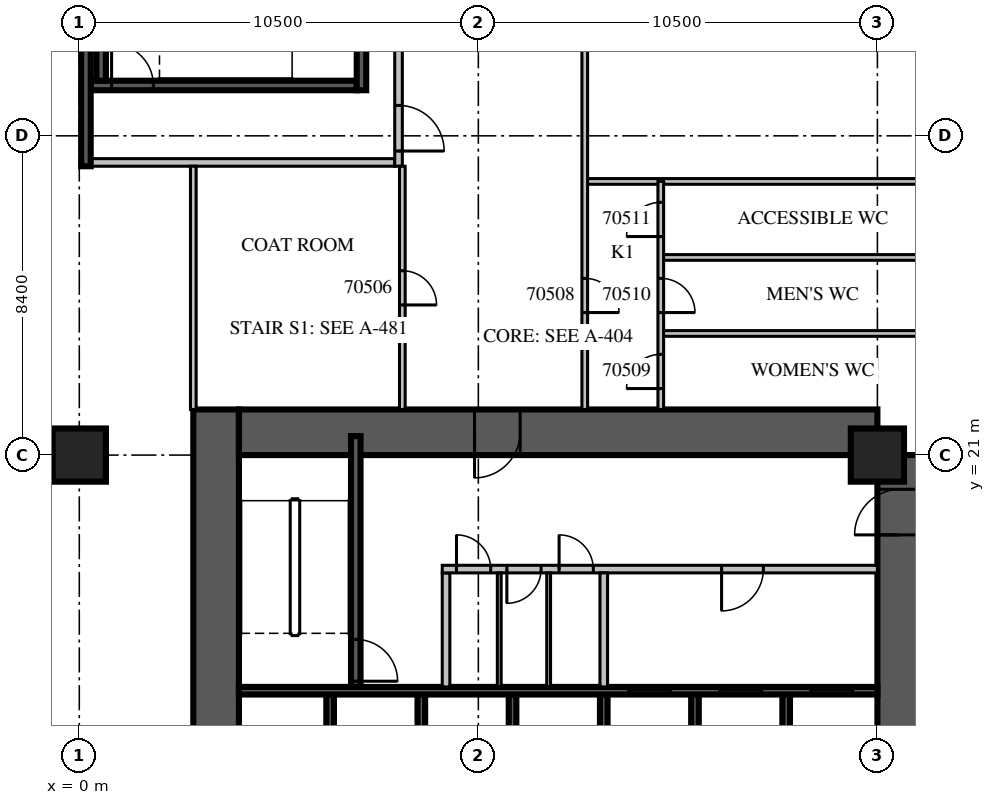
"""IFC4 building model, lengths in metres.
Left out: names, types, materials, properties, quantities, classifications, styles, units other than length and angle.
Written with IfcOpenShell. Run it as: python <this file> out.ifc"""

import sys

from ifc_helpers import new_model, si_unit, direction, frame, frame_2d, origin, origin_2d, place, context, subcontext, project, spatial, rectangle, extrude, source, transform, mapped, element, fill, save


model = new_model("IFC4")
c1 = context("Model", 3, precision=1e-05, world=origin(), true_north=direction((0.0, 1.0)))
c2 = subcontext(c1, "Body", "Model", "MODEL_VIEW")
j1 = project(units=[si_unit("LENGTHUNIT", "METRE"), si_unit("PLANEANGLEUNIT", "RADIAN")], contexts=[c1])
p1 = place(None, origin())
s1 = spatial("IfcSite", under=j1, at=p1, CompositionType="ELEMENT")
p2 = place(p1, origin())
s2 = spatial("IfcBuilding", under=s1, at=p2, CompositionType="ELEMENT")
p3 = place(p2, frame((0.0, 0.0, 12.9)))
s3 = spatial("IfcBuildingStorey", under=s2, at=p3, CompositionType="ELEMENT", Elevation=12.9)
m1 = source(origin(), c2, "Body", "SweptSolid", [
    extrude(rectangle(XDim=1.4, YDim=1.4, at=origin_2d()), origin(), (0.0, 0.0, 1.0), 5.4),
])
for number, where, z_axis, x_axis in (
    (1, (0.0, 21.0, 0.0), (0.0, 0.0, 1.0), (1.0, 0.0, 0.0)),
    (2, (21.0, 21.0, 0.0), (0.0, 0.0, 1.0), (1.0, 0.0, 0.0)),
):
    element("IfcColumn", number, at=place(p3, frame(where, z_axis=z_axis, x_axis=x_axis)), inside=s3, PredefinedType="COLUMN", context=c2, shape_type="MappedRepresentation", body=[
        mapped(m1, transform((0.0, 0.0, 0.0), scale=1.0)),
    ])
m2 = source(origin(), c2, "Body", "SweptSolid", [
    extrude(rectangle(XDim=18.0, YDim=1.2, at=frame_2d((9.0, 0.0))), origin(), (0.0, 0.0, 1.0), 5.4),
])
p4 = place(p3, frame((3.6, 4.2, 0.0), z_axis=(0.0, 0.0, 1.0), x_axis=(0.0, 1.0, 0.0)))
e3 = element("IfcWall", 3, at=p4, inside=s3, PredefinedType="SHEAR", context=c2, shape_type="MappedRepresentation", body=[
    mapped(m2, transform((0.0, 0.0, 0.0), scale=1.0)),
])
m3 = source(origin(), c2, "Body", "SweptSolid", [
    extrude(rectangle(XDim=2.2, YDim=2.1, at=frame_2d((1.1, 1.05))), frame((0.0, 0.61, 0.0), z_axis=(0.0, -1.0, 0.0), x_axis=(1.0, 0.0, 0.0)), (0.0, 0.0, 1.0), 1.22),
])
p5 = place(p4, frame((4.6, 0.0, 0.0)))
e4 = element("IfcOpeningElement", 4, at=p5, cuts=e3, PredefinedType="OPENING", context=c2, shape_type="MappedRepresentation", body=[
    mapped(m3, transform((0.0, 0.0, 0.0), scale=1.0)),
])
m4 = source(origin(), c2, "Body", "SweptSolid", [
    extrude(rectangle(XDim=16.8, YDim=1.2, at=frame_2d((8.4, 0.0))), origin(), (0.0, 0.0, 1.0), 5.4),
])
p6 = place(p3, frame((21.6, 4.2, 0.0), z_axis=(0.0, 0.0, 1.0), x_axis=(0.0, 1.0, 0.0)))
e5 = element("IfcWall", 5, at=p6, inside=s3, PredefinedType="SHEAR", context=c2, shape_type="MappedRepresentation", body=[
    mapped(m4, transform((0.0, 0.0, 0.0), scale=1.0)),
])
p7 = place(p6, frame((4.2, 0.0, 0.0)))
e6 = element("IfcOpeningElement", 6, at=p7, cuts=e5, PredefinedType="OPENING", context=c2, shape_type="MappedRepresentation", body=[
    mapped(m3, transform((0.0, 0.0, 0.0), scale=1.0)),
])
m5 = source(origin(), c2, "Body", "SweptSolid", [
    extrude(rectangle(XDim=1.2, YDim=2.1, at=frame_2d((0.6, 1.05))), frame((0.0, 0.61, 0.0), z_axis=(0.0, -1.0, 0.0), x_axis=(1.0, 0.0, 0.0)), (0.0, 0.0, 1.0), 1.22),
])
p8 = place(p6, frame((14.7, 0.0, 0.0)))
e7 = element("IfcOpeningElement", 7, at=p8, cuts=e5, PredefinedType="OPENING", context=c2, shape_type="MappedRepresentation", body=[
    mapped(m5, transform((0.0, 0.0, 0.0), scale=1.0)),
])
p9 = place(p3, frame((4.2, 21.6, 0.0), z_axis=(0.0, 0.0, 1.0), x_axis=(1.0, 0.0, 0.0)))
e8 = element("IfcWall", 8, at=p9, inside=s3, PredefinedType="SHEAR", context=c2, shape_type="MappedRepresentation", body=[
    mapped(m4, transform((0.0, 0.0, 0.0), scale=1.0)),
])
p10 = place(p9, frame((6.2, 0.0, 0.0)))
e9 = element("IfcOpeningElement", 9, at=p10, cuts=e8, PredefinedType="OPENING", context=c2, shape_type="MappedRepresentation", body=[
    mapped(m5, transform((0.0, 0.0, 0.0), scale=1.0)),
])
m6 = source(origin(), c2, "Body", "SweptSolid", [
    extrude(rectangle(XDim=3.0, YDim=0.2, at=frame_2d((1.5, 0.0))), origin(), (0.0, 0.0, 1.0), 5.4),
])
for number, where, z_axis, x_axis in (
    (10, (6.6, 11.7, 0.0), (0.0, 0.0, 1.0), (0.0, 1.0, 0.0)),
    (11, (9.0, 11.7, 0.0), (0.0, 0.0, 1.0), (0.0, 1.0, 0.0)),
    (12, (11.4, 11.7, 0.0), (0.0, 0.0, 1.0), (0.0, 1.0, 0.0)),
    (13, (13.8, 11.7, 0.0), (0.0, 0.0, 1.0), (0.0, 1.0, 0.0)),
    (14, (16.2, 11.7, 0.0), (0.0, 0.0, 1.0), (0.0, 1.0, 0.0)),
    (15, (18.6, 11.7, 0.0), (0.0, 0.0, 1.0), (0.0, 1.0, 0.0)),
):
    element("IfcWall", number, at=place(p3, frame(where, z_axis=z_axis, x_axis=x_axis)), inside=s3, PredefinedType="SOLIDWALL", context=c2, shape_type="MappedRepresentation", body=[
        mapped(m6, transform((0.0, 0.0, 0.0), scale=1.0)),
    ])
m7 = source(origin(), c2, "Body", "SweptSolid", [
    extrude(rectangle(XDim=16.8, YDim=0.2, at=frame_2d((8.4, 0.0))), origin(), (0.0, 0.0, 1.0), 5.4),
])
p11 = place(p3, frame((4.2, 14.8, 0.0), z_axis=(0.0, 0.0, 1.0), x_axis=(1.0, 0.0, 0.0)))
e16 = element("IfcWall", 16, at=p11, inside=s3, PredefinedType="SOLIDWALL", context=c2, shape_type="MappedRepresentation", body=[
    mapped(m7, transform((0.0, 0.0, 0.0), scale=1.0)),
])
m8 = source(origin(), c2, "Body", "SweptSolid", [
    extrude(rectangle(XDim=1.1, YDim=2.1, at=frame_2d((0.55, 1.05))), frame((0.0, 0.11, 0.0), z_axis=(0.0, -1.0, 0.0), x_axis=(1.0, 0.0, 0.0)), (0.0, 0.0, 1.0), 0.22),
])
p12 = place(p11, frame((10.25, 0.0, 0.0)))
e17 = element("IfcOpeningElement", 17, at=p12, cuts=e16, PredefinedType="OPENING", context=c2, shape_type="MappedRepresentation", body=[
    mapped(m8, transform((0.0, 0.0, 0.0), scale=1.0)),
])
p13 = place(p11, frame((12.65, 0.0, 0.0)))
e18 = element("IfcOpeningElement", 18, at=p13, cuts=e16, PredefinedType="OPENING", context=c2, shape_type="MappedRepresentation", body=[
    mapped(m8, transform((0.0, 0.0, 0.0), scale=1.0)),
])
p14 = place(p11, frame((15.05, 0.0, 0.0)))
e19 = element("IfcOpeningElement", 19, at=p14, cuts=e16, PredefinedType="OPENING", context=c2, shape_type="MappedRepresentation", body=[
    mapped(m8, transform((0.0, 0.0, 0.0), scale=1.0)),
])
m9 = source(origin(), c2, "Body", "SweptSolid", [
    extrude(rectangle(XDim=6.6, YDim=0.25, at=frame_2d((3.3, 0.0))), origin(), (0.0, 0.0, 1.0), 4.8),
])
p15 = place(p3, frame((7.275, 14.9, 0.0), z_axis=(0.0, 0.0, 1.0), x_axis=(0.0, 1.0, 0.0)))
e20 = element("IfcWall", 20, at=p15, inside=s3, PredefinedType="SOLIDWALL", context=c2, shape_type="MappedRepresentation", body=[
    mapped(m9, transform((0.0, 0.0, 0.0), scale=1.0)),
])
m10 = source(origin(), c2, "Body", "SweptSolid", [
    extrude(rectangle(XDim=1.1, YDim=2.1, at=frame_2d((0.55, 1.05))), frame((0.0, 0.135, 0.0), z_axis=(0.0, -1.0, 0.0), x_axis=(1.0, 0.0, 0.0)), (0.0, 0.0, 1.0), 0.27),
])
p16 = place(p15, frame((0.15, 0.0, 0.0)))
e21 = element("IfcOpeningElement", 21, at=p16, cuts=e20, PredefinedType="OPENING", context=c2, shape_type="MappedRepresentation", body=[
    mapped(m10, transform((0.0, 0.0, 0.0), scale=1.0)),
])
m11 = source(origin(), c2, "Body", "SweptSolid", [
    extrude(rectangle(XDim=3.0, YDim=0.2, at=frame_2d((1.5, 0.0))), origin(), (0.0, 0.0, 1.0), 4.8),
])
p17 = place(p3, frame((9.65, 14.9, 0.0), z_axis=(0.0, 0.0, 1.0), x_axis=(0.0, 1.0, 0.0)))
e22 = element("IfcWall", 22, at=p17, inside=s3, PredefinedType="PARTITIONING", context=c2, shape_type="MappedRepresentation", body=[
    mapped(m11, transform((0.0, 0.0, 0.0), scale=1.0)),
])
m12 = source(origin(), c2, "Body", "SweptSolid", [
    extrude(rectangle(XDim=11.45, YDim=0.2, at=frame_2d((5.725, 0.0))), origin(), (0.0, 0.0, 1.0), 4.8),
])
p18 = place(p3, frame((9.55, 18.0, 0.0), z_axis=(0.0, 0.0, 1.0), x_axis=(1.0, 0.0, 0.0)))
e23 = element("IfcWall", 23, at=p18, inside=s3, PredefinedType="PARTITIONING", context=c2, shape_type="MappedRepresentation", body=[
    mapped(m12, transform((0.0, 0.0, 0.0), scale=1.0)),
])
m13 = source(origin(), c2, "Body", "SweptSolid", [
    extrude(rectangle(XDim=0.9, YDim=2.1, at=frame_2d((0.45, 1.05))), frame((0.0, 0.11, 0.0), z_axis=(0.0, -1.0, 0.0), x_axis=(1.0, 0.0, 0.0)), (0.0, 0.0, 1.0), 0.22),
])
p19 = place(p18, frame((0.375, 0.0, 0.0)))
e24 = element("IfcOpeningElement", 24, at=p19, cuts=e23, PredefinedType="OPENING", context=c2, shape_type="MappedRepresentation", body=[
    mapped(m13, transform((0.0, 0.0, 0.0), scale=1.0)),
])
p20 = place(p18, frame((1.7, 0.0, 0.0)))
e25 = element("IfcOpeningElement", 25, at=p20, cuts=e23, PredefinedType="OPENING", context=c2, shape_type="MappedRepresentation", body=[
    mapped(m13, transform((0.0, 0.0, 0.0), scale=1.0)),
])
p21 = place(p18, frame((3.075, 0.0, 0.0)))
e26 = element("IfcOpeningElement", 26, at=p21, cuts=e23, PredefinedType="OPENING", context=c2, shape_type="MappedRepresentation", body=[
    mapped(m13, transform((0.0, 0.0, 0.0), scale=1.0)),
])
p22 = place(p18, frame((7.35, 0.0, 0.0)))
e27 = element("IfcOpeningElement", 27, at=p22, cuts=e23, PredefinedType="OPENING", context=c2, shape_type="MappedRepresentation", body=[
    mapped(m8, transform((0.0, 0.0, 0.0), scale=1.0)),
])
p23 = place(p3, frame((13.8, 14.9, 0.0), z_axis=(0.0, 0.0, 1.0), x_axis=(0.0, 1.0, 0.0)))
e28 = element("IfcWall", 28, at=p23, inside=s3, PredefinedType="PARTITIONING", context=c2, shape_type="MappedRepresentation", body=[
    mapped(m11, transform((0.0, 0.0, 0.0), scale=1.0)),
])
m14 = source(origin(), c2, "Body", "SweptSolid", [
    extrude(rectangle(XDim=3.0, YDim=0.1, at=frame_2d((1.5, 0.0))), origin(), (0.0, 0.0, 1.0), 4.8),
])
for number, where, z_axis, x_axis in (
    (29, (11.05, 14.9, 0.0), (0.0, 0.0, 1.0), (0.0, 1.0, 0.0)),
    (30, (12.35, 14.9, 0.0), (0.0, 0.0, 1.0), (0.0, 1.0, 0.0)),
):
    element("IfcWall", number, at=place(p3, frame(where, z_axis=z_axis, x_axis=x_axis)), inside=s3, PredefinedType="PARTITIONING", context=c2, shape_type="MappedRepresentation", body=[
        mapped(m14, transform((0.0, 0.0, 0.0), scale=1.0)),
    ])
m15 = source(origin(), c2, "Body", "SweptSolid", [
    extrude(rectangle(XDim=7.0, YDim=0.25, at=frame_2d((3.5, 0.0))), origin(), (0.0, 0.0, 1.0), 4.8),
])
p24 = place(p3, frame((0.3, 30.725, 0.0), z_axis=(0.0, 0.0, 1.0), x_axis=(1.0, 0.0, 0.0)))
e31 = element("IfcWall", 31, at=p24, inside=s3, PredefinedType="SOLIDWALL", context=c2, shape_type="MappedRepresentation", body=[
    mapped(m15, transform((0.0, 0.0, 0.0), scale=1.0)),
])
p25 = place(p24, frame((0.55, 0.0, 0.0)))
e32 = element("IfcOpeningElement", 32, at=p25, cuts=e31, PredefinedType="OPENING", context=c2, shape_type="MappedRepresentation", body=[
    mapped(m10, transform((0.0, 0.0, 0.0), scale=1.0)),
])
m16 = source(origin(), c2, "Body", "SweptSolid", [
    extrude(rectangle(XDim=3.45, YDim=0.25, at=frame_2d((1.725, 0.0))), origin(), (0.0, 0.0, 1.0), 4.8),
])
p26 = place(p3, frame((7.425, 30.6, 0.0), z_axis=(0.0, 0.0, 1.0), x_axis=(0.0, 1.0, 0.0)))
e33 = element("IfcWall", 33, at=p26, inside=s3, PredefinedType="SOLIDWALL", context=c2, shape_type="MappedRepresentation", body=[
    mapped(m16, transform((0.0, 0.0, 0.0), scale=1.0)),
])
m17 = source(origin(), c2, "Body", "SweptSolid", [
    extrude(rectangle(XDim=2.95, YDim=0.25, at=frame_2d((1.475, 0.0))), origin(), (0.0, 0.0, 1.0), 4.8),
])
p27 = place(p3, frame((0.575, 30.85, 0.0), z_axis=(0.0, 0.0, 1.0), x_axis=(0.0, 1.0, 0.0)))
e34 = element("IfcWall", 34, at=p27, inside=s3, PredefinedType="SOLIDWALL", context=c2, shape_type="MappedRepresentation", body=[
    mapped(m17, transform((0.0, 0.0, 0.0), scale=1.0)),
])
m18 = source(origin(), c2, "Body", "SweptSolid", [
    extrude(rectangle(XDim=8.0, YDim=0.2, at=frame_2d((4.0, 0.0))), origin(), (0.0, 0.0, 1.0), 4.8),
])
p28 = place(p3, frame((0.3, 28.7, 0.0), z_axis=(0.0, 0.0, 1.0), x_axis=(1.0, 0.0, 0.0)))
e35 = element("IfcWall", 35, at=p28, inside=s3, PredefinedType="PARTITIONING", context=c2, shape_type="MappedRepresentation", body=[
    mapped(m18, transform((0.0, 0.0, 0.0), scale=1.0)),
])
m19 = source(origin(), c2, "Body", "SweptSolid", [
    extrude(rectangle(XDim=5.45, YDim=0.2, at=frame_2d((2.725, 0.0))), origin(), (0.0, 0.0, 1.0), 4.8),
])
p29 = place(p3, frame((8.4, 28.6, 0.0), z_axis=(0.0, 0.0, 1.0), x_axis=(0.0, 1.0, 0.0)))
e36 = element("IfcWall", 36, at=p29, inside=s3, PredefinedType="PARTITIONING", context=c2, shape_type="MappedRepresentation", body=[
    mapped(m19, transform((0.0, 0.0, 0.0), scale=1.0)),
])
m20 = source(origin(), c2, "Body", "SweptSolid", [
    extrude(rectangle(XDim=1.2, YDim=2.1, at=frame_2d((0.6, 1.05))), frame((0.0, 0.11, 0.0), z_axis=(0.0, -1.0, 0.0), x_axis=(1.0, 0.0, 0.0)), (0.0, 0.0, 1.0), 0.22),
])
p30 = place(p29, frame((0.4, 0.0, 0.0)))
e37 = element("IfcOpeningElement", 37, at=p30, cuts=e36, PredefinedType="OPENING", context=c2, shape_type="MappedRepresentation", body=[
    mapped(m20, transform((0.0, 0.0, 0.0), scale=1.0)),
])
p31 = place(p29, frame((3.25, 0.0, 0.0)))
e38 = element("IfcOpeningElement", 38, at=p31, cuts=e36, PredefinedType="OPENING", context=c2, shape_type="MappedRepresentation", body=[
    mapped(m13, transform((0.0, 0.0, 0.0), scale=1.0)),
])
m21 = source(origin(), c2, "Body", "SweptSolid", [
    extrude(rectangle(XDim=5.45, YDim=0.25, at=frame_2d((2.725, 0.0))), origin(), (0.0, 0.0, 1.0), 4.8),
])
p32 = place(p3, frame((0.175, 28.6, 0.0), z_axis=(0.0, 0.0, 1.0), x_axis=(0.0, 1.0, 0.0)))
e39 = element("IfcWall", 39, at=p32, inside=s3, PredefinedType="SOLIDWALL", context=c2, shape_type="MappedRepresentation", body=[
    mapped(m21, transform((0.0, 0.0, 0.0), scale=1.0)),
])
m22 = source(origin(), c2, "Body", "SweptSolid", [
    extrude(rectangle(XDim=8.0, YDim=0.15, at=frame_2d((4.0, 0.0))), origin(), (0.0, 0.0, 1.0), 4.8),
])
for number, where, z_axis, x_axis in (
    (40, (15.3, 24.2, 0.0), (0.0, 0.0, 1.0), (1.0, 0.0, 0.0)),
    (41, (15.3, 26.2, 0.0), (0.0, 0.0, 1.0), (1.0, 0.0, 0.0)),
):
    element("IfcWall", number, at=place(p3, frame(where, z_axis=z_axis, x_axis=x_axis)), inside=s3, PredefinedType="PARTITIONING", context=c2, shape_type="MappedRepresentation", body=[
        mapped(m22, transform((0.0, 0.0, 0.0), scale=1.0)),
    ])
m23 = source(origin(), c2, "Body", "SweptSolid", [
    extrude(rectangle(XDim=10.0, YDim=0.15, at=frame_2d((5.0, 0.0))), origin(), (0.0, 0.0, 1.0), 4.8),
])
p33 = place(p3, frame((13.3, 28.2, 0.0), z_axis=(0.0, 0.0, 1.0), x_axis=(1.0, 0.0, 0.0)))
e42 = element("IfcWall", 42, at=p33, inside=s3, PredefinedType="PARTITIONING", context=c2, shape_type="MappedRepresentation", body=[
    mapped(m23, transform((0.0, 0.0, 0.0), scale=1.0)),
])
m24 = source(origin(), c2, "Body", "SweptSolid", [
    extrude(rectangle(XDim=6.4, YDim=0.15, at=frame_2d((3.2, 0.0))), origin(), (0.0, 0.0, 1.0), 4.8),
])
p34 = place(p3, frame((3.0, 22.2, 0.0), z_axis=(0.0, 0.0, 1.0), x_axis=(0.0, 1.0, 0.0)))
e43 = element("IfcWall", 43, at=p34, inside=s3, PredefinedType="PARTITIONING", context=c2, shape_type="MappedRepresentation", body=[
    mapped(m24, transform((0.0, 0.0, 0.0), scale=1.0)),
])
p35 = place(p3, frame((8.5, 22.2, 0.0), z_axis=(0.0, 0.0, 1.0), x_axis=(0.0, 1.0, 0.0)))
e44 = element("IfcWall", 44, at=p35, inside=s3, PredefinedType="PARTITIONING", context=c2, shape_type="MappedRepresentation", body=[
    mapped(m24, transform((0.0, 0.0, 0.0), scale=1.0)),
])
m25 = source(origin(), c2, "Body", "SweptSolid", [
    extrude(rectangle(XDim=0.9, YDim=2.1, at=frame_2d((0.45, 1.05))), frame((0.0, 0.085, 0.0), z_axis=(0.0, -1.0, 0.0), x_axis=(1.0, 0.0, 0.0)), (0.0, 0.0, 1.0), 0.17),
])
p36 = place(p35, frame((2.75, 0.0, 0.0)))
e45 = element("IfcOpeningElement", 45, at=p36, cuts=e44, PredefinedType="OPENING", context=c2, shape_type="MappedRepresentation", body=[
    mapped(m25, transform((0.0, 0.0, 0.0), scale=1.0)),
])
m26 = source(origin(), c2, "Body", "SweptSolid", [
    extrude(rectangle(XDim=20.3, YDim=0.15, at=frame_2d((10.15, 0.0))), origin(), (0.0, 0.0, 1.0), 4.8),
])
p37 = place(p3, frame((13.3, 22.2, 0.0), z_axis=(0.0, 0.0, 1.0), x_axis=(0.0, 1.0, 0.0)))
e46 = element("IfcWall", 46, at=p37, inside=s3, PredefinedType="PARTITIONING", context=c2, shape_type="MappedRepresentation", body=[
    mapped(m26, transform((0.0, 0.0, 0.0), scale=1.0)),
])
p38 = place(p37, frame((2.55, 0.0, 0.0)))
e47 = element("IfcOpeningElement", 47, at=p38, cuts=e46, PredefinedType="OPENING", context=c2, shape_type="MappedRepresentation", body=[
    mapped(m25, transform((0.0, 0.0, 0.0), scale=1.0)),
])
m27 = source(origin(), c2, "Body", "SweptSolid", [
    extrude(rectangle(XDim=6.0, YDim=0.15, at=frame_2d((3.0, 0.0))), origin(), (0.0, 0.0, 1.0), 4.8),
])
p39 = place(p3, frame((15.3, 22.2, 0.0), z_axis=(0.0, 0.0, 1.0), x_axis=(0.0, 1.0, 0.0)))
e48 = element("IfcWall", 48, at=p39, inside=s3, PredefinedType="PARTITIONING", context=c2, shape_type="MappedRepresentation", body=[
    mapped(m27, transform((0.0, 0.0, 0.0), scale=1.0)),
])
p40 = place(p39, frame((0.55, 0.0, 0.0)))
e49 = element("IfcOpeningElement", 49, at=p40, cuts=e48, PredefinedType="OPENING", context=c2, shape_type="MappedRepresentation", body=[
    mapped(m25, transform((0.0, 0.0, 0.0), scale=1.0)),
])
p41 = place(p39, frame((2.55, 0.0, 0.0)))
e50 = element("IfcOpeningElement", 50, at=p41, cuts=e48, PredefinedType="OPENING", context=c2, shape_type="MappedRepresentation", body=[
    mapped(m25, transform((0.0, 0.0, 0.0), scale=1.0)),
])
p42 = place(p39, frame((4.55, 0.0, 0.0)))
e51 = element("IfcOpeningElement", 51, at=p42, cuts=e48, PredefinedType="OPENING", context=c2, shape_type="MappedRepresentation", body=[
    mapped(m25, transform((0.0, 0.0, 0.0), scale=1.0)),
])
m28 = source(origin(), c2, "Body", "SweptSolid", [
    extrude(rectangle(XDim=1.1, YDim=2.1, at=frame_2d((0.55, 1.05))), frame((0.0, 0.025, 0.0), z_axis=(0.0, -1.0, 0.0), x_axis=(1.0, 0.0, 0.0)), (0.0, 0.0, 1.0), 0.05),
])
p43 = place(p12, origin())
e52 = element("IfcDoor", 52, at=p43, inside=s3, OperationType="SLIDING_TO_LEFT", PredefinedType="DOOR", context=c2, shape_type="MappedRepresentation", body=[
    mapped(m28, transform((0.0, 0.0, 0.0), scale=1.0)),
])
fill(e17, e52)
p44 = place(p13, origin())
e53 = element("IfcDoor", 53, at=p44, inside=s3, OperationType="SLIDING_TO_LEFT", PredefinedType="DOOR", context=c2, shape_type="MappedRepresentation", body=[
    mapped(m28, transform((0.0, 0.0, 0.0), scale=1.0)),
])
fill(e18, e53)
p45 = place(p14, origin())
e54 = element("IfcDoor", 54, at=p45, inside=s3, OperationType="SLIDING_TO_LEFT", PredefinedType="DOOR", context=c2, shape_type="MappedRepresentation", body=[
    mapped(m28, transform((0.0, 0.0, 0.0), scale=1.0)),
])
fill(e19, e54)
p46 = place(p16, origin())
e55 = element("IfcDoor", 55, at=p46, inside=s3, OperationType="SINGLE_SWING_RIGHT", PredefinedType="DOOR", context=c2, shape_type="MappedRepresentation", body=[
    mapped(m28, transform((0.0, 0.0, 0.0), scale=1.0)),
])
fill(e21, e55)
m29 = source(origin(), c2, "Body", "SweptSolid", [
    extrude(rectangle(XDim=0.9, YDim=2.1, at=frame_2d((0.45, 1.05))), frame((0.0, 0.025, 0.0), z_axis=(0.0, -1.0, 0.0), x_axis=(1.0, 0.0, 0.0)), (0.0, 0.0, 1.0), 0.05),
])
p47 = place(p19, origin())
e56 = element("IfcDoor", 56, at=p47, inside=s3, OperationType="SINGLE_SWING_LEFT", PredefinedType="DOOR", context=c2, shape_type="MappedRepresentation", body=[
    mapped(m29, transform((0.0, 0.0, 0.0), scale=1.0)),
])
fill(e24, e56)
p48 = place(p20, origin())
e57 = element("IfcDoor", 57, at=p48, inside=s3, OperationType="SINGLE_SWING_RIGHT", PredefinedType="DOOR", context=c2, shape_type="MappedRepresentation", body=[
    mapped(m29, transform((0.0, 0.0, 0.0), scale=1.0)),
])
fill(e25, e57)
p49 = place(p21, origin())
e58 = element("IfcDoor", 58, at=p49, inside=s3, OperationType="SINGLE_SWING_LEFT", PredefinedType="DOOR", context=c2, shape_type="MappedRepresentation", body=[
    mapped(m29, transform((0.0, 0.0, 0.0), scale=1.0)),
])
fill(e26, e58)
p50 = place(p22, origin())
e59 = element("IfcDoor", 59, at=p50, inside=s3, OperationType="SINGLE_SWING_RIGHT", PredefinedType="DOOR", context=c2, shape_type="MappedRepresentation", body=[
    mapped(m28, transform((0.0, 0.0, 0.0), scale=1.0)),
])
fill(e27, e59)
p51 = place(p25, origin())
e60 = element("IfcDoor", 60, at=p51, inside=s3, OperationType="SINGLE_SWING_LEFT", PredefinedType="DOOR", context=c2, shape_type="MappedRepresentation", body=[
    mapped(m28, transform((0.0, 0.0, 0.0), scale=1.0)),
])
fill(e32, e60)
m30 = source(origin(), c2, "Body", "SweptSolid", [
    extrude(rectangle(XDim=1.2, YDim=2.1, at=frame_2d((0.6, 1.05))), frame((0.0, 0.025, 0.0), z_axis=(0.0, -1.0, 0.0), x_axis=(1.0, 0.0, 0.0)), (0.0, 0.0, 1.0), 0.05),
])
p52 = place(p30, origin())
e61 = element("IfcDoor", 61, at=p52, inside=s3, OperationType="SINGLE_SWING_RIGHT", PredefinedType="DOOR", context=c2, shape_type="MappedRepresentation", body=[
    mapped(m30, transform((0.0, 0.0, 0.0), scale=1.0)),
])
fill(e37, e61)
p53 = place(p10, origin())
e62 = element("IfcDoor", 62, at=p53, inside=s3, OperationType="SINGLE_SWING_RIGHT", PredefinedType="DOOR", context=c2, shape_type="MappedRepresentation", body=[
    mapped(m30, transform((0.0, 0.0, 0.0), scale=1.0)),
])
fill(e9, e62)
p54 = place(p8, origin())
e63 = element("IfcDoor", 63, at=p54, inside=s3, OperationType="SINGLE_SWING_LEFT", PredefinedType="DOOR", context=c2, shape_type="MappedRepresentation", body=[
    mapped(m30, transform((0.0, 0.0, 0.0), scale=1.0)),
])
fill(e7, e63)
p55 = place(p36, origin())
e64 = element("IfcDoor", 64, at=p55, inside=s3, OperationType="SINGLE_SWING_RIGHT", PredefinedType="DOOR", context=c2, shape_type="MappedRepresentation", body=[
    mapped(m29, transform((0.0, 0.0, 0.0), scale=1.0)),
])
fill(e45, e64)
p56 = place(p38, origin())
e65 = element("IfcDoor", 65, at=p56, inside=s3, OperationType="SINGLE_SWING_RIGHT", PredefinedType="DOOR", context=c2, shape_type="MappedRepresentation", body=[
    mapped(m29, transform((0.0, 0.0, 0.0), scale=1.0)),
])
fill(e47, e65)
p57 = place(p40, origin())
e66 = element("IfcDoor", 66, at=p57, inside=s3, OperationType="SINGLE_SWING_LEFT", PredefinedType="DOOR", context=c2, shape_type="MappedRepresentation", body=[
    mapped(m29, transform((0.0, 0.0, 0.0), scale=1.0)),
])
fill(e49, e66)
p58 = place(p41, origin())
e67 = element("IfcDoor", 67, at=p58, inside=s3, OperationType="SINGLE_SWING_RIGHT", PredefinedType="DOOR", context=c2, shape_type="MappedRepresentation", body=[
    mapped(m29, transform((0.0, 0.0, 0.0), scale=1.0)),
])
fill(e50, e67)
p59 = place(p42, origin())
e68 = element("IfcDoor", 68, at=p59, inside=s3, OperationType="SINGLE_SWING_LEFT", PredefinedType="DOOR", context=c2, shape_type="MappedRepresentation", body=[
    mapped(m29, transform((0.0, 0.0, 0.0), scale=1.0)),
])
fill(e51, e68)
save(model, sys.argv[1])
